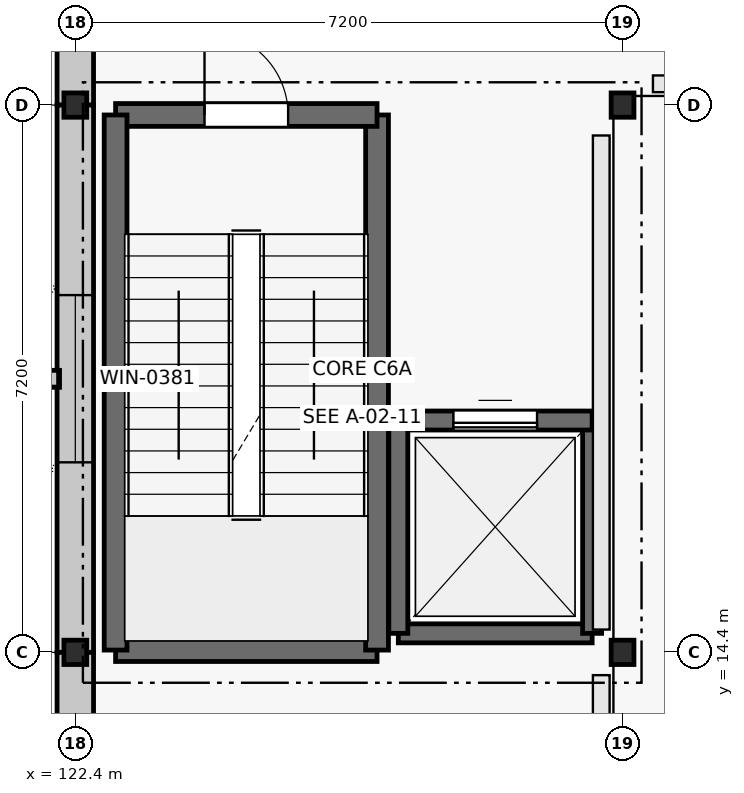
"""IFC4 building model, lengths in metres.
Left out: names, types, materials, properties, quantities, classifications, styles, units other than length and angle.
Written with IfcOpenShell. Run it as: python <this file> out.ifc"""

import sys

from ifc_helpers import new_model, si_unit, direction, frame, frame_2d, origin, origin_2d, place, context, subcontext, project, spatial, rectangle, i_section, extrude, element, fill, save


model = new_model("IFC4")
c1 = context("Model", 3, precision=1e-05, world=origin(), true_north=direction((0.0, 1.0)))
c2 = subcontext(c1, "Body", "Model", "MODEL_VIEW")
j1 = project(units=[si_unit("LENGTHUNIT", "METRE"), si_unit("PLANEANGLEUNIT", "RADIAN")], contexts=[c1])
p1 = place(None, origin())
s1 = spatial("IfcSite", under=j1, at=p1, CompositionType="ELEMENT")
p2 = place(p1, origin())
s2 = spatial("IfcBuilding", under=s1, at=p2, CompositionType="ELEMENT")
p3 = place(p2, frame((0.0, 0.0, 5.4)))
s3 = spatial("IfcBuildingStorey", under=s2, at=p3, CompositionType="ELEMENT", Elevation=5.4)
for number, where, z_axis, x_axis in (
    (1, (122.4, 14.4, 0.0), (0.0, 0.0, 1.0), (1.0, 0.0, 0.0)),
    (2, (122.4, 21.6, 0.0), (0.0, 0.0, 1.0), (1.0, 0.0, 0.0)),
    (3, (129.6, 14.4, 0.0), (0.0, 0.0, 1.0), (1.0, 0.0, 0.0)),
    (4, (129.6, 21.6, 0.0), (0.0, 0.0, 1.0), (1.0, 0.0, 0.0)),
):
    element("IfcColumn", number, at=place(p3, frame(where, z_axis=z_axis, x_axis=x_axis)), inside=s3, PredefinedType="COLUMN", context=c2, shape_type="SweptSolid", body=[
        extrude(i_section(OverallWidth=0.3, OverallDepth=0.32, WebThickness=0.011, FlangeThickness=0.021, FilletRadius=0.027, at=origin_2d()), origin(), (0.0, 0.0, 1.0), 4.8),
    ])
p4 = place(p3, frame((122.4, 28.8, 0.0), z_axis=(0.0, 0.0, 1.0), x_axis=(0.0, -1.0, 0.0)))
e5 = element("IfcWall", 5, at=p4, inside=s3, PredefinedType="SOLIDWALL", context=c2, shape_type="SweptSolid", body=[
    extrude(rectangle(XDim=7.2, YDim=0.48, at=frame_2d((3.6, 0.0))), origin(), (0.0, 0.0, 1.0), 3.8),
])
p5 = place(p4, frame((2.5, 0.0, 0.9)))
e6 = element("IfcOpeningElement", 6, at=p5, cuts=e5, PredefinedType="OPENING", context=c2, shape_type="SweptSolid", body=[
    extrude(rectangle(XDim=2.2, YDim=2.25, at=frame_2d((1.1, 1.125))), frame((0.0, 0.252, 0.0), z_axis=(0.0, -1.0, 0.0), x_axis=(1.0, 0.0, 0.0)), (0.0, 0.0, 1.0), 0.504),
])
p6 = place(p3, frame((122.4, 21.6, 0.0), z_axis=(0.0, 0.0, 1.0), x_axis=(0.0, -1.0, 0.0)))
e7 = element("IfcWall", 7, at=p6, inside=s3, PredefinedType="SOLIDWALL", context=c2, shape_type="SweptSolid", body=[
    extrude(rectangle(XDim=7.2, YDim=0.48, at=frame_2d((3.6, 0.0))), origin(), (0.0, 0.0, 1.0), 3.8),
])
p7 = place(p6, frame((2.5, 0.0, 0.9)))
e8 = element("IfcOpeningElement", 8, at=p7, cuts=e7, PredefinedType="OPENING", context=c2, shape_type="SweptSolid", body=[
    extrude(rectangle(XDim=2.2, YDim=2.25, at=frame_2d((1.1, 1.125))), frame((0.0, 0.252, 0.0), z_axis=(0.0, -1.0, 0.0), x_axis=(1.0, 0.0, 0.0)), (0.0, 0.0, 1.0), 0.504),
])
p8 = place(p3, frame((122.4, 14.4, 0.0), z_axis=(0.0, 0.0, 1.0), x_axis=(0.0, -1.0, 0.0)))
e9 = element("IfcWall", 9, at=p8, inside=s3, PredefinedType="SOLIDWALL", context=c2, shape_type="SweptSolid", body=[
    extrude(rectangle(XDim=7.2, YDim=0.48, at=frame_2d((3.6, 0.0))), origin(), (0.0, 0.0, 1.0), 3.8),
])
p9 = place(p8, frame((2.5, 0.0, 0.9)))
e10 = element("IfcOpeningElement", 10, at=p9, cuts=e9, PredefinedType="OPENING", context=c2, shape_type="SweptSolid", body=[
    extrude(rectangle(XDim=2.2, YDim=2.25, at=frame_2d((1.1, 1.125))), frame((0.0, 0.252, 0.0), z_axis=(0.0, -1.0, 0.0), x_axis=(1.0, 0.0, 0.0)), (0.0, 0.0, 1.0), 0.504),
])
p10 = place(p3, frame((122.93, 14.43, 0.0), z_axis=(0.0, 0.0, 1.0), x_axis=(1.0, 0.0, 0.0)))
e11 = element("IfcWall", 11, at=p10, inside=s3, PredefinedType="SHEAR", context=c2, shape_type="SweptSolid", body=[
    extrude(rectangle(XDim=3.44, YDim=0.3, at=frame_2d((1.72, 0.0))), origin(), (0.0, 0.0, 1.0), 4.52),
])
p11 = place(p3, frame((126.37, 14.43, 0.0), z_axis=(0.0, 0.0, 1.0), x_axis=(0.0, 1.0, 0.0)))
e12 = element("IfcWall", 12, at=p11, inside=s3, PredefinedType="SHEAR", context=c2, shape_type="SweptSolid", body=[
    extrude(rectangle(XDim=7.04, YDim=0.3, at=frame_2d((3.52, 0.0))), origin(), (0.0, 0.0, 1.0), 4.52),
])
p12 = place(p3, frame((126.37, 21.47, 0.0), z_axis=(0.0, 0.0, 1.0), x_axis=(-1.0, 0.0, 0.0)))
e13 = element("IfcWall", 13, at=p12, inside=s3, PredefinedType="SHEAR", context=c2, shape_type="SweptSolid", body=[
    extrude(rectangle(XDim=3.44, YDim=0.3, at=frame_2d((1.72, 0.0))), origin(), (0.0, 0.0, 1.0), 4.52),
])
p13 = place(p12, frame((1.17, 0.0, 0.0)))
e14 = element("IfcOpeningElement", 14, at=p13, cuts=e13, PredefinedType="OPENING", context=c2, shape_type="SweptSolid", body=[
    extrude(rectangle(XDim=1.1, YDim=2.15, at=frame_2d((0.55, 1.075))), frame((0.0, 0.162, 0.0), z_axis=(0.0, -1.0, 0.0), x_axis=(1.0, 0.0, 0.0)), (0.0, 0.0, 1.0), 0.324),
])
p14 = place(p3, frame((122.93, 21.47, 0.0), z_axis=(0.0, 0.0, 1.0), x_axis=(0.0, -1.0, 0.0)))
e15 = element("IfcWall", 15, at=p14, inside=s3, PredefinedType="SHEAR", context=c2, shape_type="SweptSolid", body=[
    extrude(rectangle(XDim=7.04, YDim=0.3, at=frame_2d((3.52, 0.0))), origin(), (0.0, 0.0, 1.0), 4.52),
])
p15 = place(p3, frame((126.65, 14.65, 0.0), z_axis=(0.0, 0.0, 1.0), x_axis=(1.0, 0.0, 0.0)))
e16 = element("IfcWall", 16, at=p15, inside=s3, PredefinedType="SHEAR", context=c2, shape_type="SweptSolid", body=[
    extrude(rectangle(XDim=2.55, YDim=0.25, at=frame_2d((1.275, 0.0))), origin(), (0.0, 0.0, 1.0), 4.52),
])
p16 = place(p3, frame((129.2, 14.65, 0.0), z_axis=(0.0, 0.0, 1.0), x_axis=(0.0, 1.0, 0.0)))
e17 = element("IfcWall", 17, at=p16, inside=s3, PredefinedType="SHEAR", context=c2, shape_type="SweptSolid", body=[
    extrude(rectangle(XDim=2.8, YDim=0.25, at=frame_2d((1.4, 0.0))), origin(), (0.0, 0.0, 1.0), 4.52),
])
p17 = place(p3, frame((129.2, 17.45, 0.0), z_axis=(0.0, 0.0, 1.0), x_axis=(-1.0, 0.0, 0.0)))
e18 = element("IfcWall", 18, at=p17, inside=s3, PredefinedType="SHEAR", context=c2, shape_type="SweptSolid", body=[
    extrude(rectangle(XDim=2.55, YDim=0.25, at=frame_2d((1.275, 0.0))), origin(), (0.0, 0.0, 1.0), 4.52),
])
p18 = place(p17, frame((0.725, 0.0, 0.0)))
e19 = element("IfcOpeningElement", 19, at=p18, cuts=e18, PredefinedType="OPENING", context=c2, shape_type="SweptSolid", body=[
    extrude(rectangle(XDim=1.1, YDim=2.1, at=frame_2d((0.55, 1.05))), frame((0.0, 0.137, 0.0), z_axis=(0.0, -1.0, 0.0), x_axis=(1.0, 0.0, 0.0)), (0.0, 0.0, 1.0), 0.274),
])
p19 = place(p3, frame((126.65, 17.45, 0.0), z_axis=(0.0, 0.0, 1.0), x_axis=(0.0, -1.0, 0.0)))
e20 = element("IfcWall", 20, at=p19, inside=s3, PredefinedType="SHEAR", context=c2, shape_type="SweptSolid", body=[
    extrude(rectangle(XDim=2.8, YDim=0.25, at=frame_2d((1.4, 0.0))), origin(), (0.0, 0.0, 1.0), 4.52),
])
p20 = place(p7, origin())
e21 = element("IfcWindow", 21, at=p20, inside=s3, PartitioningType="SINGLE_PANEL", PredefinedType="WINDOW", context=c2, shape_type="SweptSolid", body=[
    extrude(rectangle(XDim=2.2, YDim=2.25, at=frame_2d((1.1, 1.125))), frame((0.0, 0.03, 0.0), z_axis=(0.0, -1.0, 0.0), x_axis=(1.0, 0.0, 0.0)), (0.0, 0.0, 1.0), 0.06),
])
fill(e8, e21)
p21 = place(p13, frame((1.1, 0.0, 0.0), z_axis=(0.0, 0.0, 1.0), x_axis=(-1.0, 0.0, 0.0)))
e22 = element("IfcDoor", 22, at=p21, inside=s3, OperationType="SINGLE_SWING_LEFT", PredefinedType="DOOR", context=c2, shape_type="SweptSolid", body=[
    extrude(rectangle(XDim=1.1, YDim=2.15, at=frame_2d((0.55, 1.075))), frame((0.0, 0.025, 0.0), z_axis=(0.0, -1.0, 0.0), x_axis=(1.0, 0.0, 0.0)), (0.0, 0.0, 1.0), 0.05),
])
fill(e14, e22)
p22 = place(p18, origin())
e23 = element("IfcDoor", 23, at=p22, inside=s3, OperationType="SLIDING_TO_LEFT", PredefinedType="DOOR", context=c2, shape_type="SweptSolid", body=[
    extrude(rectangle(XDim=1.1, YDim=2.1, at=frame_2d((0.55, 1.05))), frame((0.0, 0.025, 0.0), z_axis=(0.0, -1.0, 0.0), x_axis=(1.0, 0.0, 0.0)), (0.0, 0.0, 1.0), 0.05),
])
fill(e19, e23)
save(model, sys.argv[1])
